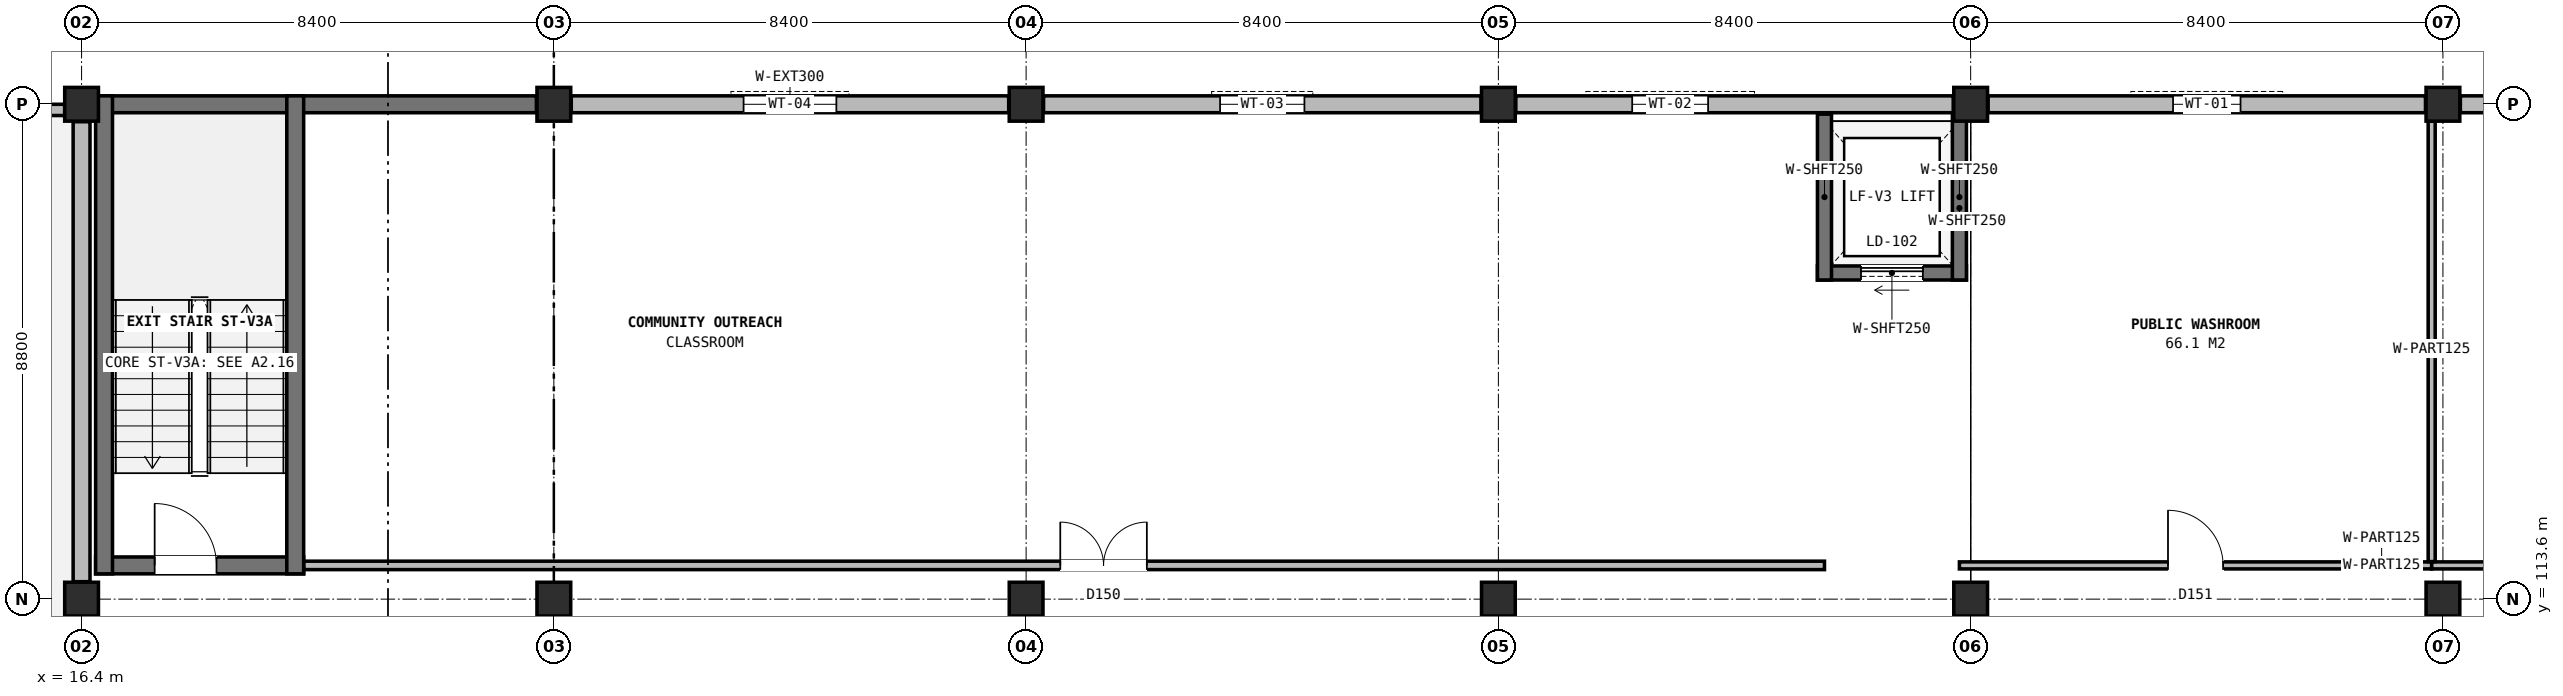
"""IFC4 building model, lengths in metres.
Left out: names, types, materials, properties, quantities, classifications, styles, units other than length and angle.
Written with IfcOpenShell. Run it as: python <this file> out.ifc"""

import sys

from ifc_helpers import new_model, si_unit, direction, frame, frame_2d, origin, origin_2d, place, context, subcontext, project, spatial, rectangle, extrude, element, fill, save


model = new_model("IFC4")
c1 = context("Model", 3, precision=1e-05, world=origin(), true_north=direction((0.0, 1.0)))
c2 = subcontext(c1, "Body", "Model", "MODEL_VIEW")
j1 = project(units=[si_unit("LENGTHUNIT", "METRE"), si_unit("PLANEANGLEUNIT", "RADIAN")], contexts=[c1])
p1 = place(None, origin())
s1 = spatial("IfcSite", under=j1, at=p1, CompositionType="ELEMENT")
p2 = place(p1, origin())
s2 = spatial("IfcBuilding", under=s1, at=p2, CompositionType="ELEMENT")
p3 = place(p2, frame((0.0, 0.0, 4.8)))
s3 = spatial("IfcBuildingStorey", under=s2, at=p3, CompositionType="ELEMENT", Elevation=4.8)
for number, where, z_axis, x_axis in (
    (1, (16.4, 113.6, 0.0), (0.0, 0.0, 1.0), (1.0, 0.0, 0.0)),
    (2, (16.4, 122.4, 0.0), (0.0, 0.0, 1.0), (1.0, 0.0, 0.0)),
    (3, (24.8, 113.6, 0.0), (0.0, 0.0, 1.0), (1.0, 0.0, 0.0)),
    (4, (24.8, 122.4, 0.0), (0.0, 0.0, 1.0), (1.0, 0.0, 0.0)),
    (5, (33.2, 113.6, 0.0), (0.0, 0.0, 1.0), (1.0, 0.0, 0.0)),
    (6, (33.2, 122.4, 0.0), (0.0, 0.0, 1.0), (1.0, 0.0, 0.0)),
    (7, (41.6, 113.6, 0.0), (0.0, 0.0, 1.0), (1.0, 0.0, 0.0)),
    (8, (41.6, 122.4, 0.0), (0.0, 0.0, 1.0), (1.0, 0.0, 0.0)),
    (9, (50.0, 113.6, 0.0), (0.0, 0.0, 1.0), (1.0, 0.0, 0.0)),
    (10, (50.0, 122.4, 0.0), (0.0, 0.0, 1.0), (1.0, 0.0, 0.0)),
    (11, (58.4, 113.6, 0.0), (0.0, 0.0, 1.0), (1.0, 0.0, 0.0)),
    (12, (58.4, 122.4, 0.0), (0.0, 0.0, 1.0), (1.0, 0.0, 0.0)),
):
    element("IfcColumn", number, at=place(p3, frame(where, z_axis=z_axis, x_axis=x_axis)), inside=s3, PredefinedType="COLUMN", context=c2, shape_type="SweptSolid", body=[
        extrude(rectangle(XDim=0.6, YDim=0.6, at=origin_2d()), origin(), (0.0, 0.0, 1.0), 4.2),
    ])
p4 = place(p3, frame((66.49, 122.4, 0.0), z_axis=(0.0, 0.0, 1.0), x_axis=(-1.0, 0.0, 0.0)))
e13 = element("IfcWall", 13, at=p4, inside=s3, PredefinedType="SOLIDWALL", context=c2, shape_type="SweptSolid", body=[
    extrude(rectangle(XDim=7.78, YDim=0.3, at=frame_2d((3.89, 0.0))), origin(), (0.0, 0.0, 1.0), 3.45),
])
p5 = place(p4, frame((2.97, 0.0, 0.9)))
e14 = element("IfcOpeningElement", 14, at=p5, cuts=e13, PredefinedType="OPENING", context=c2, shape_type="SweptSolid", body=[
    extrude(rectangle(XDim=1.84, YDim=2.34, at=frame_2d((0.92, 1.17))), frame((0.0, 0.16, 0.0), z_axis=(0.0, -1.0, 0.0), x_axis=(1.0, 0.0, 0.0)), (0.0, 0.0, 1.0), 0.32),
])
p6 = place(p3, frame((58.09, 122.4, 0.0), z_axis=(0.0, 0.0, 1.0), x_axis=(-1.0, 0.0, 0.0)))
e15 = element("IfcWall", 15, at=p6, inside=s3, PredefinedType="SOLIDWALL", context=c2, shape_type="SweptSolid", body=[
    extrude(rectangle(XDim=7.78, YDim=0.3, at=frame_2d((3.89, 0.0))), origin(), (0.0, 0.0, 1.0), 3.45),
])
p7 = place(p6, frame((3.29, 0.0, 0.9)))
e16 = element("IfcOpeningElement", 16, at=p7, cuts=e15, PredefinedType="OPENING", context=c2, shape_type="SweptSolid", body=[
    extrude(rectangle(XDim=1.2, YDim=1.8, at=frame_2d((0.6, 0.9))), frame((0.0, 0.16, 0.0), z_axis=(0.0, -1.0, 0.0), x_axis=(1.0, 0.0, 0.0)), (0.0, 0.0, 1.0), 0.32),
])
p8 = place(p3, frame((49.69, 122.4, 0.0), z_axis=(0.0, 0.0, 1.0), x_axis=(-1.0, 0.0, 0.0)))
e17 = element("IfcWall", 17, at=p8, inside=s3, PredefinedType="SOLIDWALL", context=c2, shape_type="SweptSolid", body=[
    extrude(rectangle(XDim=7.78, YDim=0.3, at=frame_2d((3.89, 0.0))), origin(), (0.0, 0.0, 1.0), 3.45),
])
p9 = place(p8, frame((4.36, 0.0, 0.9)))
e18 = element("IfcOpeningElement", 18, at=p9, cuts=e17, PredefinedType="OPENING", context=c2, shape_type="SweptSolid", body=[
    extrude(rectangle(XDim=1.35, YDim=1.8, at=frame_2d((0.675, 0.9))), frame((0.0, 0.16, 0.0), z_axis=(0.0, -1.0, 0.0), x_axis=(1.0, 0.0, 0.0)), (0.0, 0.0, 1.0), 0.32),
])
p10 = place(p3, frame((41.29, 122.4, 0.0), z_axis=(0.0, 0.0, 1.0), x_axis=(-1.0, 0.0, 0.0)))
e19 = element("IfcWall", 19, at=p10, inside=s3, PredefinedType="SOLIDWALL", context=c2, shape_type="SweptSolid", body=[
    extrude(rectangle(XDim=7.78, YDim=0.3, at=frame_2d((3.89, 0.0))), origin(), (0.0, 0.0, 1.0), 3.45),
])
p11 = place(p10, frame((3.14, 0.0, 0.9)))
e20 = element("IfcOpeningElement", 20, at=p11, cuts=e19, PredefinedType="OPENING", context=c2, shape_type="SweptSolid", body=[
    extrude(rectangle(XDim=1.5, YDim=1.8, at=frame_2d((0.75, 0.9))), frame((0.0, 0.16, 0.0), z_axis=(0.0, -1.0, 0.0), x_axis=(1.0, 0.0, 0.0)), (0.0, 0.0, 1.0), 0.32),
])
p12 = place(p3, frame((32.89, 122.4, 0.0), z_axis=(0.0, 0.0, 1.0), x_axis=(-1.0, 0.0, 0.0)))
e21 = element("IfcWall", 21, at=p12, inside=s3, PredefinedType="SOLIDWALL", context=c2, shape_type="SweptSolid", body=[
    extrude(rectangle(XDim=7.78, YDim=0.3, at=frame_2d((3.89, 0.0))), origin(), (0.0, 0.0, 1.0), 3.45),
])
p13 = place(p12, frame((3.065, 0.0, 0.9)))
e22 = element("IfcOpeningElement", 22, at=p13, cuts=e21, PredefinedType="OPENING", context=c2, shape_type="SweptSolid", body=[
    extrude(rectangle(XDim=1.65, YDim=1.85, at=frame_2d((0.825, 0.925))), frame((0.0, 0.16, 0.0), z_axis=(0.0, -1.0, 0.0), x_axis=(1.0, 0.0, 0.0)), (0.0, 0.0, 1.0), 0.32),
])
p14 = place(p3, frame((24.49, 122.4, 0.0), z_axis=(0.0, 0.0, 1.0), x_axis=(-1.0, 0.0, 0.0)))
e23 = element("IfcWall", 23, at=p14, inside=s3, PredefinedType="SHEAR", context=c2, shape_type="SweptSolid", body=[
    extrude(rectangle(XDim=7.78, YDim=0.3, at=frame_2d((3.89, 0.0))), origin(), (0.0, 0.0, 1.0), 3.45),
])
p15 = place(p3, frame((16.4, 122.09, 0.0), z_axis=(0.0, 0.0, 1.0), x_axis=(0.0, -1.0, 0.0)))
e24 = element("IfcWall", 24, at=p15, inside=s3, PredefinedType="SOLIDWALL", context=c2, shape_type="SweptSolid", body=[
    extrude(rectangle(XDim=8.18, YDim=0.3, at=frame_2d((4.09, 0.0))), origin(), (0.0, 0.0, 1.0), 3.45),
])
p16 = place(p3, frame((16.4, 113.29, 0.0), z_axis=(0.0, 0.0, 1.0), x_axis=(0.0, -1.0, 0.0)))
e25 = element("IfcWall", 25, at=p16, inside=s3, PredefinedType="SOLIDWALL", context=c2, shape_type="SweptSolid", body=[
    extrude(rectangle(XDim=8.18, YDim=0.3, at=frame_2d((4.09, 0.0))), origin(), (0.0, 0.0, 1.0), 3.45),
])
p17 = place(p16, frame((4.185, 0.0, 0.9)))
e26 = element("IfcOpeningElement", 26, at=p17, cuts=e25, PredefinedType="OPENING", context=c2, shape_type="SweptSolid", body=[
    extrude(rectangle(XDim=2.1, YDim=1.95, at=frame_2d((1.05, 0.975))), frame((0.0, 0.16, 0.0), z_axis=(0.0, -1.0, 0.0), x_axis=(1.0, 0.0, 0.0)), (0.0, 0.0, 1.0), 0.32),
])
p18 = place(p3, frame((8.3, 122.3, 0.0), z_axis=(0.0, 0.0, 1.0), x_axis=(1.0, 0.0, 0.0)))
e27 = element("IfcWall", 27, at=p18, inside=s3, PredefinedType="PARAPET", context=c2, shape_type="SweptSolid", body=[
    extrude(rectangle(XDim=7.8, YDim=0.2, at=frame_2d((3.9, 0.0))), origin(), (0.0, 0.0, 1.0), 1.12),
])
p19 = place(p3, frame((16.65, 114.2, 0.0), z_axis=(0.0, 0.0, 1.0), x_axis=(1.0, 0.0, 0.0)))
e28 = element("IfcWall", 28, at=p19, inside=s3, PredefinedType="SHEAR", context=c2, shape_type="SweptSolid", body=[
    extrude(rectangle(XDim=3.7, YDim=0.3, at=frame_2d((1.85, 0.0))), origin(), (0.0, 0.0, 1.0), 4.2),
])
p20 = place(p19, frame((1.05, 0.0, 0.0)))
e29 = element("IfcOpeningElement", 29, at=p20, cuts=e28, PredefinedType="OPENING", context=c2, shape_type="SweptSolid", body=[
    extrude(rectangle(XDim=1.1, YDim=2.2, at=frame_2d((0.55, 1.1))), frame((0.0, 0.16, 0.0), z_axis=(0.0, -1.0, 0.0), x_axis=(1.0, 0.0, 0.0)), (0.0, 0.0, 1.0), 0.32),
])
for number, where, z_axis, x_axis in (
    (30, (16.8, 114.05, 0.0), (0.0, 0.0, 1.0), (0.0, 1.0, 0.0)),
    (31, (20.2, 114.05, 0.0), (0.0, 0.0, 1.0), (0.0, 1.0, 0.0)),
):
    element("IfcWall", number, at=place(p3, frame(where, z_axis=z_axis, x_axis=x_axis)), inside=s3, PredefinedType="SHEAR", context=c2, shape_type="SweptSolid", body=[
        extrude(rectangle(XDim=8.5, YDim=0.3, at=frame_2d((4.25, 0.0))), origin(), (0.0, 0.0, 1.0), 4.2),
    ])
p21 = place(p3, frame((47.275, 119.4, 0.0), z_axis=(0.0, 0.0, 1.0), x_axis=(1.0, 0.0, 0.0)))
e32 = element("IfcWall", 32, at=p21, inside=s3, PredefinedType="SOLIDWALL", context=c2, shape_type="SweptSolid", body=[
    extrude(rectangle(XDim=2.65, YDim=0.25, at=frame_2d((1.325, 0.0))), origin(), (0.0, 0.0, 1.0), 3.88),
])
p22 = place(p21, frame((0.775, 0.0, 0.0)))
e33 = element("IfcOpeningElement", 33, at=p22, cuts=e32, PredefinedType="OPENING", context=c2, shape_type="SweptSolid", body=[
    extrude(rectangle(XDim=1.1, YDim=2.2, at=frame_2d((0.55, 1.1))), frame((0.0, 0.135, 0.0), z_axis=(0.0, -1.0, 0.0), x_axis=(1.0, 0.0, 0.0)), (0.0, 0.0, 1.0), 0.27),
])
for number, where, z_axis, x_axis in (
    (34, (47.4, 119.275, 0.0), (0.0, 0.0, 1.0), (0.0, 1.0, 0.0)),
    (35, (49.8, 119.275, 0.0), (0.0, 0.0, 1.0), (0.0, 1.0, 0.0)),
):
    element("IfcWall", number, at=place(p3, frame(where, z_axis=z_axis, x_axis=x_axis)), inside=s3, PredefinedType="SOLIDWALL", context=c2, shape_type="SweptSolid", body=[
        extrude(rectangle(XDim=2.95, YDim=0.25, at=frame_2d((1.475, 0.0))), origin(), (0.0, 0.0, 1.0), 3.88),
    ])
p23 = place(p3, frame((20.355, 114.2, 0.0), z_axis=(0.0, 0.0, 1.0), x_axis=(1.0, 0.0, 0.0)))
e36 = element("IfcWall", 36, at=p23, inside=s3, PredefinedType="PARTITIONING", context=c2, shape_type="SweptSolid", body=[
    extrude(rectangle(XDim=27.045, YDim=0.15, at=frame_2d((13.522, 0.0))), origin(), (0.0, 0.0, 1.0), 3.865),
])
p24 = place(p23, frame((13.452, 0.0, 0.0)))
e37 = element("IfcOpeningElement", 37, at=p24, cuts=e36, PredefinedType="OPENING", context=c2, shape_type="SweptSolid", body=[
    extrude(rectangle(XDim=1.54, YDim=2.3, at=frame_2d((0.77, 1.15))), frame((0.0, 0.085, 0.0), z_axis=(0.0, -1.0, 0.0), x_axis=(1.0, 0.0, 0.0)), (0.0, 0.0, 1.0), 0.17),
])
p25 = place(p3, frame((49.8, 114.2, 0.0), z_axis=(0.0, 0.0, 1.0), x_axis=(1.0, 0.0, 0.0)))
e38 = element("IfcWall", 38, at=p25, inside=s3, PredefinedType="PARTITIONING", context=c2, shape_type="SweptSolid", body=[
    extrude(rectangle(XDim=8.4, YDim=0.125, at=frame_2d((4.2, 0.0))), origin(), (0.0, 0.0, 1.0), 3.865),
])
p26 = place(p25, frame((3.71, 0.0, 0.0)))
e39 = element("IfcOpeningElement", 39, at=p26, cuts=e38, PredefinedType="OPENING", context=c2, shape_type="SweptSolid", body=[
    extrude(rectangle(XDim=0.98, YDim=2.1, at=frame_2d((0.49, 1.05))), frame((0.0, 0.073, 0.0), z_axis=(0.0, -1.0, 0.0), x_axis=(1.0, 0.0, 0.0)), (0.0, 0.0, 1.0), 0.145),
])
p27 = place(p3, frame((58.2, 114.2, 0.0), z_axis=(0.0, 0.0, 1.0), x_axis=(1.0, 0.0, 0.0)))
e40 = element("IfcWall", 40, at=p27, inside=s3, PredefinedType="PARTITIONING", context=c2, shape_type="SweptSolid", body=[
    extrude(rectangle(XDim=8.4, YDim=0.125, at=frame_2d((4.2, 0.0))), origin(), (0.0, 0.0, 1.0), 3.865),
])
p28 = place(p27, frame((3.71, 0.0, 0.0)))
e41 = element("IfcOpeningElement", 41, at=p28, cuts=e40, PredefinedType="OPENING", context=c2, shape_type="SweptSolid", body=[
    extrude(rectangle(XDim=0.98, YDim=2.1, at=frame_2d((0.49, 1.05))), frame((0.0, 0.073, 0.0), z_axis=(0.0, -1.0, 0.0), x_axis=(1.0, 0.0, 0.0)), (0.0, 0.0, 1.0), 0.145),
])
p29 = place(p3, frame((58.2, 114.268, 0.0), z_axis=(0.0, 0.0, 1.0), x_axis=(0.0, 1.0, 0.0)))
e42 = element("IfcWall", 42, at=p29, inside=s3, PredefinedType="PARTITIONING", context=c2, shape_type="SweptSolid", body=[
    extrude(rectangle(XDim=7.833, YDim=0.125, at=frame_2d((3.916, 0.0))), origin(), (0.0, 0.0, 1.0), 3.445),
])
p30 = place(p7, origin())
e43 = element("IfcWindow", 43, at=p30, inside=s3, PartitioningType="SINGLE_PANEL", PredefinedType="WINDOW", context=c2, shape_type="SweptSolid", body=[
    extrude(rectangle(XDim=1.2, YDim=1.8, at=frame_2d((0.6, 0.9))), frame((0.0, 0.03, 0.0), z_axis=(0.0, -1.0, 0.0), x_axis=(1.0, 0.0, 0.0)), (0.0, 0.0, 1.0), 0.06),
])
fill(e16, e43)
p31 = place(p9, origin())
e44 = element("IfcWindow", 44, at=p31, inside=s3, PartitioningType="SINGLE_PANEL", PredefinedType="WINDOW", context=c2, shape_type="SweptSolid", body=[
    extrude(rectangle(XDim=1.35, YDim=1.8, at=frame_2d((0.675, 0.9))), frame((0.0, 0.03, 0.0), z_axis=(0.0, -1.0, 0.0), x_axis=(1.0, 0.0, 0.0)), (0.0, 0.0, 1.0), 0.06),
])
fill(e18, e44)
p32 = place(p11, origin())
e45 = element("IfcWindow", 45, at=p32, inside=s3, PartitioningType="SINGLE_PANEL", PredefinedType="WINDOW", context=c2, shape_type="SweptSolid", body=[
    extrude(rectangle(XDim=1.5, YDim=1.8, at=frame_2d((0.75, 0.9))), frame((0.0, 0.03, 0.0), z_axis=(0.0, -1.0, 0.0), x_axis=(1.0, 0.0, 0.0)), (0.0, 0.0, 1.0), 0.06),
])
fill(e20, e45)
p33 = place(p13, origin())
e46 = element("IfcWindow", 46, at=p33, inside=s3, PartitioningType="SINGLE_PANEL", PredefinedType="WINDOW", context=c2, shape_type="SweptSolid", body=[
    extrude(rectangle(XDim=1.65, YDim=1.85, at=frame_2d((0.825, 0.925))), frame((0.0, 0.03, 0.0), z_axis=(0.0, -1.0, 0.0), x_axis=(1.0, 0.0, 0.0)), (0.0, 0.0, 1.0), 0.06),
])
fill(e22, e46)
p34 = place(p20, origin())
e47 = element("IfcDoor", 47, at=p34, inside=s3, OperationType="SINGLE_SWING_LEFT", PredefinedType="DOOR", context=c2, shape_type="SweptSolid", body=[
    extrude(rectangle(XDim=1.1, YDim=2.2, at=frame_2d((0.55, 1.1))), frame((0.0, 0.025, 0.0), z_axis=(0.0, -1.0, 0.0), x_axis=(1.0, 0.0, 0.0)), (0.0, 0.0, 1.0), 0.05),
])
fill(e29, e47)
p35 = place(p22, origin())
e48 = element("IfcDoor", 48, at=p35, inside=s3, OperationType="SLIDING_TO_LEFT", PredefinedType="DOOR", context=c2, shape_type="SweptSolid", body=[
    extrude(rectangle(XDim=1.1, YDim=2.2, at=frame_2d((0.55, 1.1))), frame((0.0, 0.025, 0.0), z_axis=(0.0, -1.0, 0.0), x_axis=(1.0, 0.0, 0.0)), (0.0, 0.0, 1.0), 0.05),
])
fill(e33, e48)
p36 = place(p24, origin())
e49 = element("IfcDoor", 49, at=p36, inside=s3, OperationType="DOUBLE_DOOR_SINGLE_SWING", PredefinedType="DOOR", context=c2, shape_type="SweptSolid", body=[
    extrude(rectangle(XDim=1.54, YDim=2.3, at=frame_2d((0.77, 1.15))), frame((0.0, 0.025, 0.0), z_axis=(0.0, -1.0, 0.0), x_axis=(1.0, 0.0, 0.0)), (0.0, 0.0, 1.0), 0.05),
])
fill(e37, e49)
p37 = place(p26, origin())
e50 = element("IfcDoor", 50, at=p37, inside=s3, OperationType="SINGLE_SWING_LEFT", PredefinedType="DOOR", context=c2, shape_type="SweptSolid", body=[
    extrude(rectangle(XDim=0.98, YDim=2.1, at=frame_2d((0.49, 1.05))), frame((0.0, 0.025, 0.0), z_axis=(0.0, -1.0, 0.0), x_axis=(1.0, 0.0, 0.0)), (0.0, 0.0, 1.0), 0.05),
])
fill(e39, e50)
save(model, sys.argv[1])
